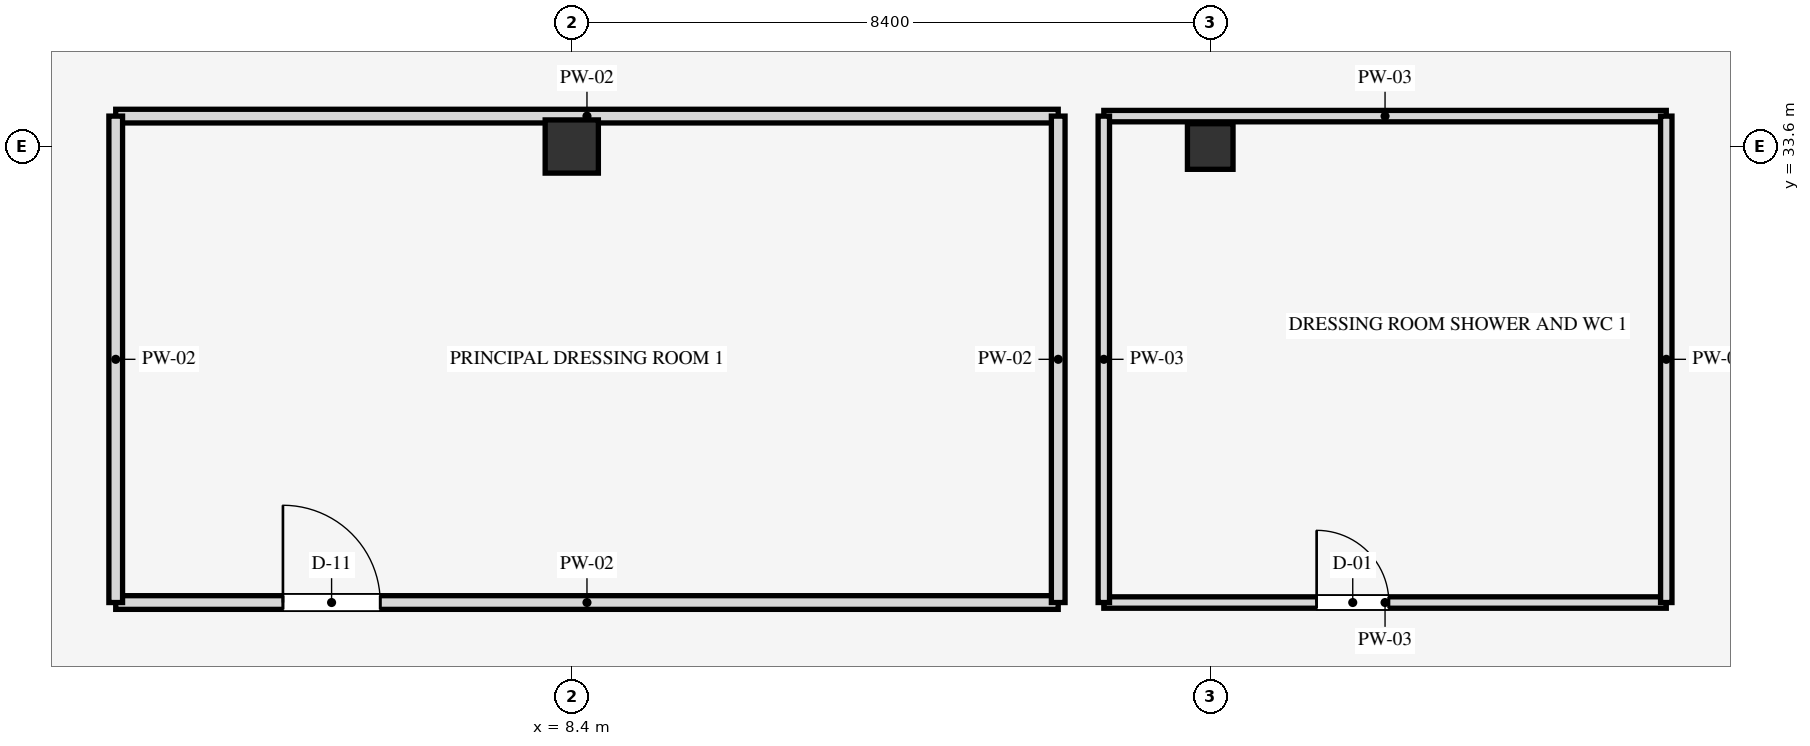
"""IFC4 building model, lengths in metres.
Left out: names, types, materials, properties, quantities, classifications, styles, units other than length and angle.
Written with IfcOpenShell. Run it as: python <this file> out.ifc"""

import sys

from ifc_helpers import new_model, si_unit, direction, frame, frame_2d, origin, origin_2d, place, context, subcontext, project, spatial, rectangle, extrude, element, fill, save


model = new_model("IFC4")
c1 = context("Model", 3, precision=1e-05, world=origin(), true_north=direction((0.0, 1.0)))
c2 = subcontext(c1, "Body", "Model", "MODEL_VIEW")
j1 = project(units=[si_unit("LENGTHUNIT", "METRE"), si_unit("PLANEANGLEUNIT", "RADIAN")], contexts=[c1])
p1 = place(None, origin())
s1 = spatial("IfcSite", under=j1, at=p1, CompositionType="ELEMENT")
p2 = place(p1, origin())
s2 = spatial("IfcBuilding", under=s1, at=p2, CompositionType="ELEMENT")
p3 = place(p2, frame((0.0, 0.0, 5.4)))
s3 = spatial("IfcBuildingStorey", under=s2, at=p3, CompositionType="ELEMENT", Elevation=5.4)
p4 = place(p3, frame((8.4, 33.6, 0.0), z_axis=(0.0, 0.0, 1.0), x_axis=(1.0, 0.0, 0.0)))
e1 = element("IfcColumn", 1, at=p4, inside=s3, PredefinedType="COLUMN", context=c2, shape_type="SweptSolid", body=[
    extrude(rectangle(XDim=0.7, YDim=0.7, at=origin_2d()), origin(), (0.0, 0.0, 1.0), 4.5),
])
p5 = place(p3, frame((16.8, 33.6, 0.0), z_axis=(0.0, 0.0, 1.0), x_axis=(1.0, 0.0, 0.0)))
e2 = element("IfcColumn", 2, at=p5, inside=s3, PredefinedType="COLUMN", context=c2, shape_type="SweptSolid", body=[
    extrude(rectangle(XDim=0.6, YDim=0.6, at=origin_2d()), origin(), (0.0, 0.0, 1.0), 4.5),
])
p6 = place(p3, frame((2.4, 27.6, 0.0), z_axis=(0.0, 0.0, 1.0), x_axis=(1.0, 0.0, 0.0)))
e3 = element("IfcWall", 3, at=p6, inside=s3, PredefinedType="PARTITIONING", context=c2, shape_type="SweptSolid", body=[
    extrude(rectangle(XDim=12.4, YDim=0.18, at=frame_2d((6.2, 0.0))), origin(), (0.0, 0.0, 1.0), 3.54),
])
p7 = place(p6, frame((2.2, 0.0, 0.0)))
e4 = element("IfcOpeningElement", 4, at=p7, cuts=e3, PredefinedType="OPENING", context=c2, shape_type="SweptSolid", body=[
    extrude(rectangle(XDim=1.28, YDim=2.16, at=frame_2d((0.64, 1.08))), frame((0.0, 0.1, 0.0), z_axis=(0.0, -1.0, 0.0), x_axis=(1.0, 0.0, 0.0)), (0.0, 0.0, 1.0), 0.2),
])
p8 = place(p3, frame((2.4, 34.0, 0.0), z_axis=(0.0, 0.0, 1.0), x_axis=(1.0, 0.0, 0.0)))
e5 = element("IfcWall", 5, at=p8, inside=s3, PredefinedType="PARTITIONING", context=c2, shape_type="SweptSolid", body=[
    extrude(rectangle(XDim=12.4, YDim=0.18, at=frame_2d((6.2, 0.0))), origin(), (0.0, 0.0, 1.0), 3.54),
])
for number, where, z_axis, x_axis in (
    (6, (2.4, 27.6, 0.0), (0.0, 0.0, 1.0), (0.0, 1.0, 0.0)),
    (7, (14.8, 27.6, 0.0), (0.0, 0.0, 1.0), (0.0, 1.0, 0.0)),
):
    element("IfcWall", number, at=place(p3, frame(where, z_axis=z_axis, x_axis=x_axis)), inside=s3, PredefinedType="PARTITIONING", context=c2, shape_type="SweptSolid", body=[
        extrude(rectangle(XDim=6.4, YDim=0.18, at=frame_2d((3.2, 0.0))), origin(), (0.0, 0.0, 1.0), 3.54),
    ])
p9 = place(p3, frame((15.4, 27.6, 0.0), z_axis=(0.0, 0.0, 1.0), x_axis=(1.0, 0.0, 0.0)))
e8 = element("IfcWall", 8, at=p9, inside=s3, PredefinedType="PARTITIONING", context=c2, shape_type="SweptSolid", body=[
    extrude(rectangle(XDim=7.4, YDim=0.15, at=frame_2d((3.7, 0.0))), origin(), (0.0, 0.0, 1.0), 3.54),
])
p10 = place(p9, frame((2.8, 0.0, 0.0)))
e9 = element("IfcOpeningElement", 9, at=p10, cuts=e8, PredefinedType="OPENING", context=c2, shape_type="SweptSolid", body=[
    extrude(rectangle(XDim=0.95, YDim=2.1, at=frame_2d((0.475, 1.05))), frame((0.0, 0.085, 0.0), z_axis=(0.0, -1.0, 0.0), x_axis=(1.0, 0.0, 0.0)), (0.0, 0.0, 1.0), 0.17),
])
p11 = place(p3, frame((15.4, 34.0, 0.0), z_axis=(0.0, 0.0, 1.0), x_axis=(1.0, 0.0, 0.0)))
e10 = element("IfcWall", 10, at=p11, inside=s3, PredefinedType="PARTITIONING", context=c2, shape_type="SweptSolid", body=[
    extrude(rectangle(XDim=7.4, YDim=0.15, at=frame_2d((3.7, 0.0))), origin(), (0.0, 0.0, 1.0), 3.54),
])
for number, where, z_axis, x_axis in (
    (11, (15.4, 27.6, 0.0), (0.0, 0.0, 1.0), (0.0, 1.0, 0.0)),
    (12, (22.8, 27.6, 0.0), (0.0, 0.0, 1.0), (0.0, 1.0, 0.0)),
):
    element("IfcWall", number, at=place(p3, frame(where, z_axis=z_axis, x_axis=x_axis)), inside=s3, PredefinedType="PARTITIONING", context=c2, shape_type="SweptSolid", body=[
        extrude(rectangle(XDim=6.4, YDim=0.15, at=frame_2d((3.2, 0.0))), origin(), (0.0, 0.0, 1.0), 3.54),
    ])
p12 = place(p7, origin())
e13 = element("IfcDoor", 13, at=p12, inside=s3, OperationType="SINGLE_SWING_LEFT", PredefinedType="DOOR", context=c2, shape_type="SweptSolid", body=[
    extrude(rectangle(XDim=1.28, YDim=2.16, at=frame_2d((0.64, 1.08))), frame((0.0, 0.025, 0.0), z_axis=(0.0, -1.0, 0.0), x_axis=(1.0, 0.0, 0.0)), (0.0, 0.0, 1.0), 0.05),
])
fill(e4, e13)
p13 = place(p10, origin())
e14 = element("IfcDoor", 14, at=p13, inside=s3, OperationType="SINGLE_SWING_LEFT", PredefinedType="DOOR", context=c2, shape_type="SweptSolid", body=[
    extrude(rectangle(XDim=0.95, YDim=2.1, at=frame_2d((0.475, 1.05))), frame((0.0, 0.025, 0.0), z_axis=(0.0, -1.0, 0.0), x_axis=(1.0, 0.0, 0.0)), (0.0, 0.0, 1.0), 0.05),
])
fill(e9, e14)
save(model, sys.argv[1])
